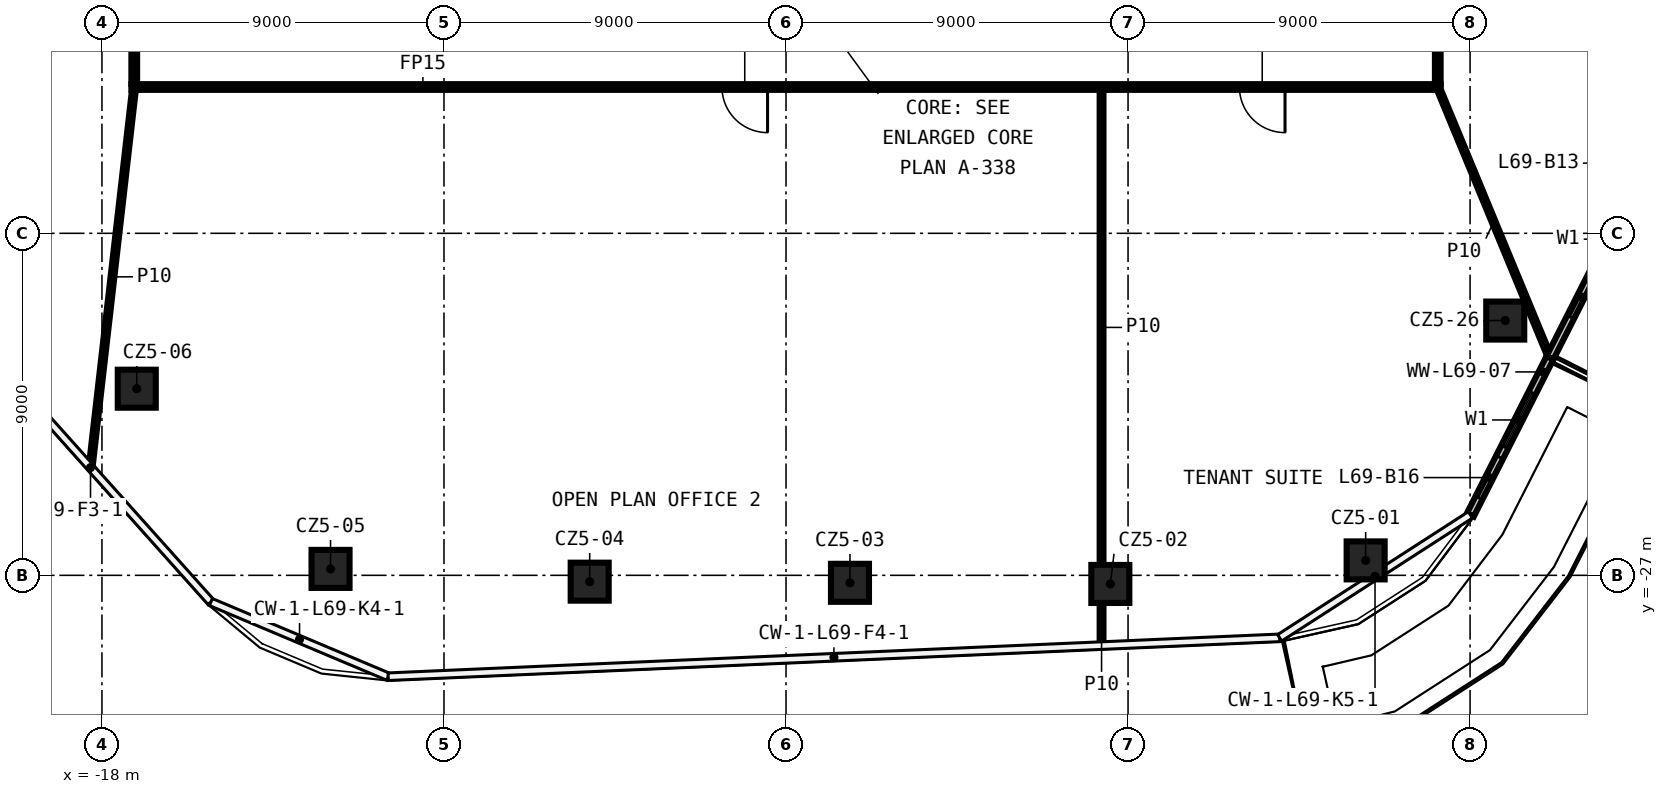
"""IFC4 building model, lengths in metres.
Left out: names, types, materials, properties, quantities, classifications, styles, units other than length and angle.
Written with IfcOpenShell. Run it as: python <this file> out.ifc"""

import sys

from ifc_helpers import new_model, si_unit, direction, frame, frame_2d, origin, origin_2d, place, context, subcontext, project, spatial, rectangle, extrude, element, fill, save


model = new_model("IFC4")
c1 = context("Model", 3, precision=1e-05, world=origin(), true_north=direction((0.0, 1.0)))
c2 = subcontext(c1, "Body", "Model", "MODEL_VIEW")
j1 = project(units=[si_unit("LENGTHUNIT", "METRE"), si_unit("PLANEANGLEUNIT", "RADIAN")], contexts=[c1])
p1 = place(None, origin())
s1 = spatial("IfcSite", under=j1, at=p1, CompositionType="ELEMENT")
p2 = place(p1, origin())
s2 = spatial("IfcBuilding", under=s1, at=p2, CompositionType="ELEMENT")
p3 = place(p2, frame((0.0, 0.0, 323.6)))
s3 = spatial("IfcBuildingStorey", under=s2, at=p3, CompositionType="ELEMENT", Elevation=323.6)
for number, where, z_axis, x_axis in (
    (1, (15.252, -26.607, 0.0), (0.0, 0.0, 1.0), (1.0, 0.0, 0.0)),
    (2, (8.534, -27.227, 0.0), (0.0, 0.0, 1.0), (1.0, 0.0, 0.0)),
    (3, (1.683, -27.197, 0.0), (0.0, 0.0, 1.0), (1.0, 0.0, 0.0)),
    (4, (-5.166, -27.167, 0.0), (0.0, 0.0, 1.0), (1.0, 0.0, 0.0)),
    (5, (-11.985, -26.831, 0.0), (0.0, 0.0, 1.0), (1.0, 0.0, 0.0)),
    (6, (-17.084, -22.089, 0.0), (0.0, 0.0, 1.0), (1.0, 0.0, 0.0)),
    (7, (18.925, -20.296, 0.0), (0.0, 0.0, 1.0), (1.0, 0.0, 0.0)),
):
    element("IfcColumn", number, at=place(p3, frame(where, z_axis=z_axis, x_axis=x_axis)), inside=s3, PredefinedType="COLUMN", context=c2, shape_type="SweptSolid", body=[
        extrude(rectangle(XDim=1.0, YDim=1.0, at=origin_2d()), origin(), (0.0, 0.0, 1.0), 3.82),
    ])
p4 = place(p3, frame((17.225, -14.15, 0.0), z_axis=(0.0, 0.0, 1.0), x_axis=(-1.0, 0.0, 0.0)))
e8 = element("IfcWall", 8, at=p4, inside=s3, PredefinedType="PARTITIONING", context=c2, shape_type="SweptSolid", body=[
    extrude(rectangle(XDim=34.45, YDim=0.15, at=frame_2d((17.225, 0.0))), origin(), (0.0, 0.0, 1.0), 3.82),
])
p5 = place(p4, frame((17.711, 0.0, 0.0)))
e9 = element("IfcOpeningElement", 9, at=p5, cuts=e8, PredefinedType="OPENING", context=c2, shape_type="SweptSolid", body=[
    extrude(rectangle(XDim=1.2, YDim=2.1, at=frame_2d((0.6, 1.05))), frame((0.0, 0.085, 0.0), z_axis=(0.0, -1.0, 0.0), x_axis=(1.0, 0.0, 0.0)), (0.0, 0.0, 1.0), 0.17),
])
p6 = place(p4, frame((4.094, 0.0, 0.0)))
e10 = element("IfcOpeningElement", 10, at=p6, cuts=e8, PredefinedType="OPENING", context=c2, shape_type="SweptSolid", body=[
    extrude(rectangle(XDim=1.2, YDim=2.1, at=frame_2d((0.6, 1.05))), frame((0.0, 0.085, 0.0), z_axis=(0.0, -1.0, 0.0), x_axis=(1.0, 0.0, 0.0)), (0.0, 0.0, 1.0), 0.17),
])
p7 = place(p3, frame((-18.296, -24.14, 0.0), z_axis=(0.0, 0.0, 1.0), x_axis=(0.11391359401, 0.993490660801, 0.0)))
e11 = element("IfcWall", 11, at=p7, inside=s3, PredefinedType="PARTITIONING", context=c2, shape_type="SweptSolid", body=[
    extrude(rectangle(XDim=10.056, YDim=0.1, at=frame_2d((5.028, 0.0))), origin(), (0.0, 0.0, 1.0), 3.82),
])
p8 = place(p3, frame((17.15, 14.075, 0.0), z_axis=(0.0, 0.0, 1.0), x_axis=(0.0, -1.0, 0.0)))
e12 = element("IfcWall", 12, at=p8, inside=s3, PredefinedType="PARTITIONING", context=c2, shape_type="SweptSolid", body=[
    extrude(rectangle(XDim=28.15, YDim=0.15, at=frame_2d((14.075, 0.0))), origin(), (0.0, 0.0, 1.0), 3.82),
])
p9 = place(p8, frame((18.186, 0.0, 0.0)))
e13 = element("IfcOpeningElement", 13, at=p9, cuts=e12, PredefinedType="OPENING", context=c2, shape_type="SweptSolid", body=[
    extrude(rectangle(XDim=1.2, YDim=2.1, at=frame_2d((0.6, 1.05))), frame((0.0, 0.085, 0.0), z_axis=(0.0, -1.0, 0.0), x_axis=(1.0, 0.0, 0.0)), (0.0, 0.0, 1.0), 0.17),
])
p10 = place(p3, frame((8.303, -28.83, 0.0), z_axis=(0.0, 0.0, 1.0), x_axis=(0.0, 1.0, 0.0)))
e14 = element("IfcWall", 14, at=p10, inside=s3, PredefinedType="PARTITIONING", context=c2, shape_type="SweptSolid", body=[
    extrude(rectangle(XDim=1.103, YDim=0.1, at=frame_2d((0.551, 0.0))), origin(), (0.0, 0.0, 1.0), 3.82),
])
p11 = place(p3, frame((8.303, -26.727, 0.0), z_axis=(0.0, 0.0, 1.0), x_axis=(0.0, 1.0, 0.0)))
e15 = element("IfcWall", 15, at=p11, inside=s3, PredefinedType="PARTITIONING", context=c2, shape_type="SweptSolid", body=[
    extrude(rectangle(XDim=12.502, YDim=0.1, at=frame_2d((6.251, 0.0))), origin(), (0.0, 0.0, 1.0), 3.82),
])
p12 = place(p3, frame((-17.15, -14.075, 0.0), z_axis=(0.0, 0.0, 1.0), x_axis=(0.0, 1.0, 0.0)))
e16 = element("IfcWall", 16, at=p12, inside=s3, PredefinedType="PARTITIONING", context=c2, shape_type="SweptSolid", body=[
    extrude(rectangle(XDim=28.15, YDim=0.15, at=frame_2d((14.075, 0.0))), origin(), (0.0, 0.0, 1.0), 3.82),
])
p13 = place(p12, frame((18.298, 0.0, 0.0)))
e17 = element("IfcOpeningElement", 17, at=p13, cuts=e16, PredefinedType="OPENING", context=c2, shape_type="SweptSolid", body=[
    extrude(rectangle(XDim=1.2, YDim=2.1, at=frame_2d((0.6, 1.05))), frame((0.0, 0.085, 0.0), z_axis=(0.0, -1.0, 0.0), x_axis=(1.0, 0.0, 0.0)), (0.0, 0.0, 1.0), 0.17),
])
p14 = place(p3, frame((17.15, -14.15, 0.0), z_axis=(0.0, 0.0, 1.0), x_axis=(0.382693080748, -0.923875535961, 0.0)))
e18 = element("IfcWall", 18, at=p14, inside=s3, PredefinedType="PARTITIONING", context=c2, shape_type="SweptSolid", body=[
    extrude(rectangle(XDim=7.687, YDim=0.1, at=frame_2d((3.843, 0.0))), origin(), (0.0, 0.0, 1.0), 3.82),
])
p15 = place(p3, frame((20.102, -21.276, 0.0), z_axis=(0.0, 0.0, 1.0), x_axis=(0.451966467013, 0.892034927957, 0.0)))
e19 = element("IfcWall", 19, at=p15, inside=s3, PredefinedType="SOLIDWALL", context=c2, shape_type="SweptSolid", body=[
    extrude(rectangle(XDim=18.57, YDim=0.2, at=frame_2d((9.285, 0.0))), origin(), (0.0, 0.0, 1.0), 3.82),
])
p16 = place(p15, frame((2.7, 0.0, 0.6)))
e20 = element("IfcOpeningElement", 20, at=p16, cuts=e19, PredefinedType="OPENING", context=c2, shape_type="SweptSolid", body=[
    extrude(rectangle(XDim=1.6, YDim=2.4, at=frame_2d((0.8, 1.2))), frame((0.0, 0.11, 0.0), z_axis=(0.0, -1.0, 0.0), x_axis=(1.0, 0.0, 0.0)), (0.0, 0.0, 1.0), 0.22),
])
p17 = place(p15, frame((1.2, 0.0, 0.0)))
e21 = element("IfcOpeningElement", 21, at=p17, cuts=e19, PredefinedType="OPENING", context=c2, shape_type="SweptSolid", body=[
    extrude(rectangle(XDim=1.2, YDim=2.4, at=frame_2d((0.6, 1.2))), frame((0.0, 0.11, 0.0), z_axis=(0.0, -1.0, 0.0), x_axis=(1.0, 0.0, 0.0)), (0.0, 0.0, 1.0), 0.22),
])
p18 = place(p15, frame((6.643, 0.0, 0.6)))
e22 = element("IfcOpeningElement", 22, at=p18, cuts=e19, PredefinedType="OPENING", context=c2, shape_type="SweptSolid", body=[
    extrude(rectangle(XDim=1.6, YDim=2.4, at=frame_2d((0.8, 1.2))), frame((0.0, 0.11, 0.0), z_axis=(0.0, -1.0, 0.0), x_axis=(1.0, 0.0, 0.0)), (0.0, 0.0, 1.0), 0.22),
])
p19 = place(p15, frame((5.143, 0.0, 0.0)))
e23 = element("IfcOpeningElement", 23, at=p19, cuts=e19, PredefinedType="OPENING", context=c2, shape_type="SweptSolid", body=[
    extrude(rectangle(XDim=1.2, YDim=2.4, at=frame_2d((0.6, 1.2))), frame((0.0, 0.11, 0.0), z_axis=(0.0, -1.0, 0.0), x_axis=(1.0, 0.0, 0.0)), (0.0, 0.0, 1.0), 0.22),
])
p20 = place(p15, frame((11.285, 0.0, 0.6)))
e24 = element("IfcOpeningElement", 24, at=p20, cuts=e19, PredefinedType="OPENING", context=c2, shape_type="SweptSolid", body=[
    extrude(rectangle(XDim=1.6, YDim=2.4, at=frame_2d((0.8, 1.2))), frame((0.0, 0.11, 0.0), z_axis=(0.0, -1.0, 0.0), x_axis=(1.0, 0.0, 0.0)), (0.0, 0.0, 1.0), 0.22),
])
p21 = place(p15, frame((9.785, 0.0, 0.0)))
e25 = element("IfcOpeningElement", 25, at=p21, cuts=e19, PredefinedType="OPENING", context=c2, shape_type="SweptSolid", body=[
    extrude(rectangle(XDim=1.2, YDim=2.4, at=frame_2d((0.6, 1.2))), frame((0.0, 0.11, 0.0), z_axis=(0.0, -1.0, 0.0), x_axis=(1.0, 0.0, 0.0)), (0.0, 0.0, 1.0), 0.22),
])
p22 = place(p15, frame((16.627, 0.0, 0.6)))
e26 = element("IfcOpeningElement", 26, at=p22, cuts=e19, PredefinedType="OPENING", context=c2, shape_type="SweptSolid", body=[
    extrude(rectangle(XDim=1.6, YDim=2.4, at=frame_2d((0.8, 1.2))), frame((0.0, 0.11, 0.0), z_axis=(0.0, -1.0, 0.0), x_axis=(1.0, 0.0, 0.0)), (0.0, 0.0, 1.0), 0.22),
])
p23 = place(p15, frame((15.127, 0.0, 0.0)))
e27 = element("IfcOpeningElement", 27, at=p23, cuts=e19, PredefinedType="OPENING", context=c2, shape_type="SweptSolid", body=[
    extrude(rectangle(XDim=1.2, YDim=2.4, at=frame_2d((0.6, 1.2))), frame((0.0, 0.11, 0.0), z_axis=(0.0, -1.0, 0.0), x_axis=(1.0, 0.0, 0.0)), (0.0, 0.0, 1.0), 0.22),
])
p24 = place(p3, frame((18.008, -25.409, 0.0), z_axis=(0.0, 0.0, 1.0), x_axis=(0.451970383378, 0.892032943646, 0.0)))
e28 = element("IfcWall", 28, at=p24, inside=s3, PredefinedType="SOLIDWALL", context=c2, shape_type="SweptSolid", body=[
    extrude(rectangle(XDim=4.634, YDim=0.2, at=frame_2d((2.317, 0.0))), origin(), (0.0, 0.0, 1.0), 3.82),
])
p25 = place(p24, frame((2.0, 0.0, 0.6)))
e29 = element("IfcOpeningElement", 29, at=p25, cuts=e28, PredefinedType="OPENING", context=c2, shape_type="SweptSolid", body=[
    extrude(rectangle(XDim=1.6, YDim=2.4, at=frame_2d((0.8, 1.2))), frame((0.0, 0.11, 0.0), z_axis=(0.0, -1.0, 0.0), x_axis=(1.0, 0.0, 0.0)), (0.0, 0.0, 1.0), 0.22),
])
p26 = place(p24, frame((0.5, 0.0, 0.0)))
e30 = element("IfcOpeningElement", 30, at=p26, cuts=e28, PredefinedType="OPENING", context=c2, shape_type="SweptSolid", body=[
    extrude(rectangle(XDim=1.2, YDim=2.4, at=frame_2d((0.6, 1.2))), frame((0.0, 0.11, 0.0), z_axis=(0.0, -1.0, 0.0), x_axis=(1.0, 0.0, 0.0)), (0.0, 0.0, 1.0), 0.22),
])
p27 = place(p5, origin())
e31 = element("IfcDoor", 31, at=p27, inside=s3, OperationType="SINGLE_SWING_LEFT", PredefinedType="DOOR", context=c2, shape_type="SweptSolid", body=[
    extrude(rectangle(XDim=1.2, YDim=2.1, at=frame_2d((0.6, 1.05))), frame((0.0, 0.025, 0.0), z_axis=(0.0, -1.0, 0.0), x_axis=(1.0, 0.0, 0.0)), (0.0, 0.0, 1.0), 0.05),
])
fill(e9, e31)
p28 = place(p6, origin())
e32 = element("IfcDoor", 32, at=p28, inside=s3, OperationType="SINGLE_SWING_RIGHT", PredefinedType="DOOR", context=c2, shape_type="SweptSolid", body=[
    extrude(rectangle(XDim=1.2, YDim=2.1, at=frame_2d((0.6, 1.05))), frame((0.0, 0.025, 0.0), z_axis=(0.0, -1.0, 0.0), x_axis=(1.0, 0.0, 0.0)), (0.0, 0.0, 1.0), 0.05),
])
fill(e10, e32)
p29 = place(p17, origin())
e33 = element("IfcDoor", 33, at=p29, inside=s3, OperationType="SLIDING_TO_LEFT", PredefinedType="DOOR", context=c2, shape_type="SweptSolid", body=[
    extrude(rectangle(XDim=1.2, YDim=2.4, at=frame_2d((0.6, 1.2))), frame((0.0, 0.025, 0.0), z_axis=(0.0, -1.0, 0.0), x_axis=(1.0, 0.0, 0.0)), (0.0, 0.0, 1.0), 0.05),
])
fill(e21, e33)
p30 = place(p25, origin())
e34 = element("IfcWindow", 34, at=p30, inside=s3, PartitioningType="SINGLE_PANEL", PredefinedType="WINDOW", context=c2, shape_type="SweptSolid", body=[
    extrude(rectangle(XDim=1.6, YDim=2.4, at=frame_2d((0.8, 1.2))), frame((0.0, 0.03, 0.0), z_axis=(0.0, -1.0, 0.0), x_axis=(1.0, 0.0, 0.0)), (0.0, 0.0, 1.0), 0.06),
])
fill(e29, e34)
p31 = place(p26, origin())
e35 = element("IfcDoor", 35, at=p31, inside=s3, OperationType="SLIDING_TO_LEFT", PredefinedType="DOOR", context=c2, shape_type="SweptSolid", body=[
    extrude(rectangle(XDim=1.2, YDim=2.4, at=frame_2d((0.6, 1.2))), frame((0.0, 0.025, 0.0), z_axis=(0.0, -1.0, 0.0), x_axis=(1.0, 0.0, 0.0)), (0.0, 0.0, 1.0), 0.05),
])
fill(e30, e35)
save(model, sys.argv[1])
